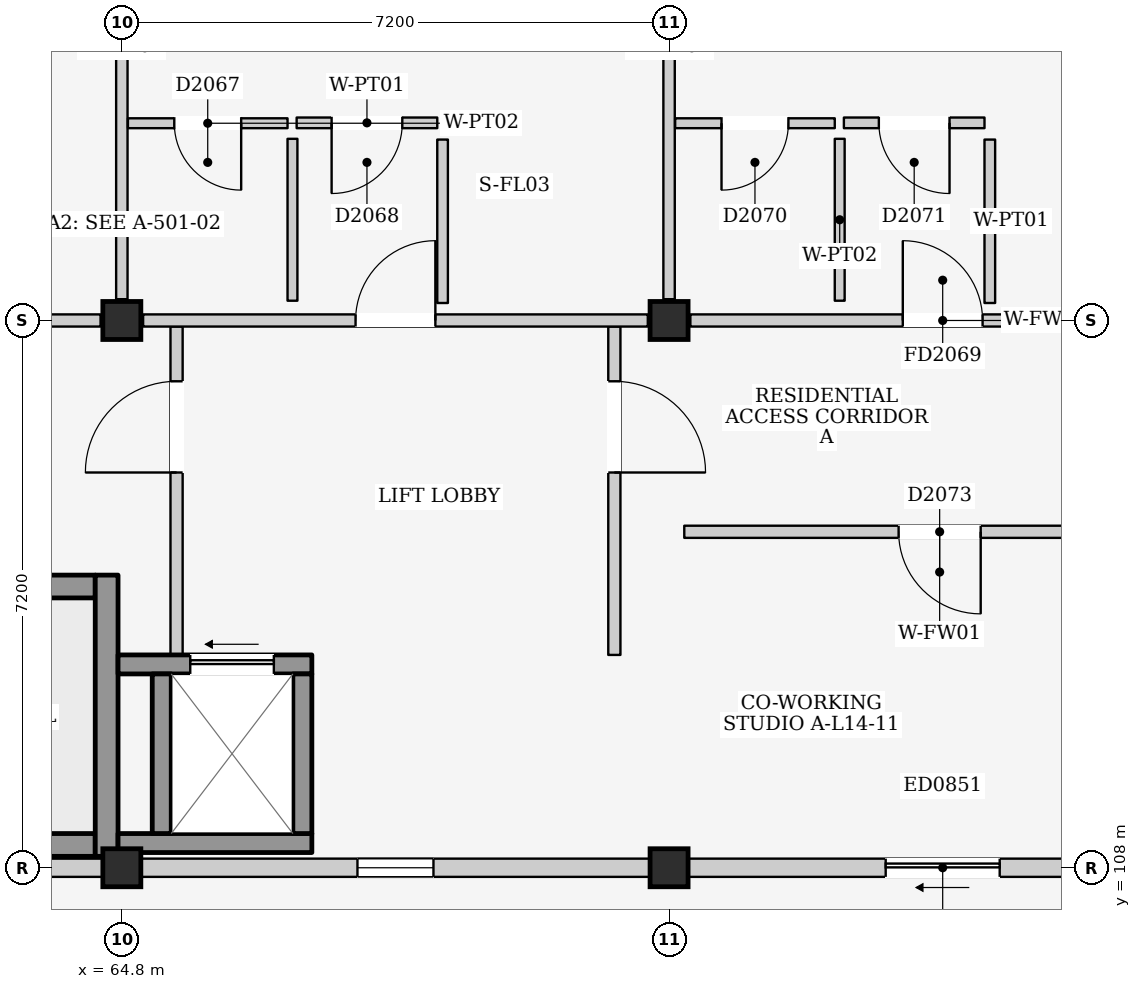
"""IFC4 building model, lengths in metres.
Left out: names, types, materials, properties, quantities, classifications, styles, units other than length and angle.
Written with IfcOpenShell. Run it as: python <this file> out.ifc"""

import sys

from ifc_helpers import new_model, si_unit, direction, frame, frame_2d, origin, origin_2d, place, context, subcontext, project, spatial, rectangle, extrude, element, fill, save


model = new_model("IFC4")
c1 = context("Model", 3, precision=1e-05, world=origin(), true_north=direction((0.0, 1.0)))
c2 = subcontext(c1, "Body", "Model", "MODEL_VIEW")
j1 = project(units=[si_unit("LENGTHUNIT", "METRE"), si_unit("PLANEANGLEUNIT", "RADIAN")], contexts=[c1])
p1 = place(None, origin())
s1 = spatial("IfcSite", under=j1, at=p1, CompositionType="ELEMENT")
p2 = place(p1, origin())
s2 = spatial("IfcBuilding", under=s1, at=p2, CompositionType="ELEMENT")
p3 = place(p2, frame((0.0, 0.0, 47.7)))
s3 = spatial("IfcBuildingStorey", under=s2, at=p3, CompositionType="ELEMENT", Elevation=47.7)
for number, where, z_axis, x_axis in (
    (1, (64.8, 108.0, 0.0), (0.0, 0.0, 1.0), (1.0, 0.0, 0.0)),
    (2, (64.8, 115.2, 0.0), (0.0, 0.0, 1.0), (1.0, 0.0, 0.0)),
    (3, (72.0, 108.0, 0.0), (0.0, 0.0, 1.0), (1.0, 0.0, 0.0)),
    (4, (72.0, 115.2, 0.0), (0.0, 0.0, 1.0), (1.0, 0.0, 0.0)),
):
    element("IfcColumn", number, at=place(p3, frame(where, z_axis=z_axis, x_axis=x_axis)), inside=s3, PredefinedType="COLUMN", context=c2, shape_type="SweptSolid", body=[
        extrude(rectangle(XDim=0.5, YDim=0.5, at=origin_2d()), origin(), (0.0, 0.0, 1.0), 3.2),
    ])
p4 = place(p3, frame((57.85, 108.0, 0.0), z_axis=(0.0, 0.0, 1.0), x_axis=(1.0, 0.0, 0.0)))
e5 = element("IfcWall", 5, at=p4, inside=s3, PredefinedType="ELEMENTEDWALL", context=c2, shape_type="SweptSolid", body=[
    extrude(rectangle(XDim=6.7, YDim=0.24, at=frame_2d((3.35, 0.0))), origin(), (0.0, 0.0, 1.0), 2.335),
])
p5 = place(p4, frame((2.85, 0.0, 1.2)))
e6 = element("IfcOpeningElement", 6, at=p5, cuts=e5, PredefinedType="OPENING", context=c2, shape_type="SweptSolid", body=[
    extrude(rectangle(XDim=1.0, YDim=0.9, at=frame_2d((0.5, 0.45))), frame((0.0, 0.135, 0.0), z_axis=(0.0, -1.0, 0.0), x_axis=(1.0, 0.0, 0.0)), (0.0, 0.0, 1.0), 0.27),
])
p6 = place(p3, frame((65.05, 108.0, 0.0), z_axis=(0.0, 0.0, 1.0), x_axis=(1.0, 0.0, 0.0)))
e7 = element("IfcWall", 7, at=p6, inside=s3, PredefinedType="ELEMENTEDWALL", context=c2, shape_type="SweptSolid", body=[
    extrude(rectangle(XDim=6.7, YDim=0.24, at=frame_2d((3.35, 0.0))), origin(), (0.0, 0.0, 1.0), 2.335),
])
p7 = place(p6, frame((2.85, 0.0, 1.2)))
e8 = element("IfcOpeningElement", 8, at=p7, cuts=e7, PredefinedType="OPENING", context=c2, shape_type="SweptSolid", body=[
    extrude(rectangle(XDim=1.0, YDim=0.9, at=frame_2d((0.5, 0.45))), frame((0.0, 0.135, 0.0), z_axis=(0.0, -1.0, 0.0), x_axis=(1.0, 0.0, 0.0)), (0.0, 0.0, 1.0), 0.27),
])
p8 = place(p3, frame((72.25, 108.0, 0.0), z_axis=(0.0, 0.0, 1.0), x_axis=(1.0, 0.0, 0.0)))
e9 = element("IfcWall", 9, at=p8, inside=s3, PredefinedType="ELEMENTEDWALL", context=c2, shape_type="SweptSolid", body=[
    extrude(rectangle(XDim=6.7, YDim=0.24, at=frame_2d((3.35, 0.0))), origin(), (0.0, 0.0, 1.0), 2.335),
])
p9 = place(p8, frame((2.6, 0.0, 0.0)))
e10 = element("IfcOpeningElement", 10, at=p9, cuts=e9, PredefinedType="OPENING", context=c2, shape_type="SweptSolid", body=[
    extrude(rectangle(XDim=1.5, YDim=2.12, at=frame_2d((0.75, 1.06))), frame((0.0, 0.135, 0.0), z_axis=(0.0, -1.0, 0.0), x_axis=(1.0, 0.0, 0.0)), (0.0, 0.0, 1.0), 0.27),
])
p10 = place(p3, frame((57.95, 108.3, 0.0), z_axis=(0.0, 0.0, 1.0), x_axis=(1.0, 0.0, 0.0)))
e11 = element("IfcWall", 11, at=p10, inside=s3, PredefinedType="SHEAR", context=c2, shape_type="SweptSolid", body=[
    extrude(rectangle(XDim=6.5, YDim=0.3, at=frame_2d((3.25, 0.0))), origin(), (0.0, 0.0, 1.0), 3.0),
])
p11 = place(p3, frame((57.95, 111.7, 0.0), z_axis=(0.0, 0.0, 1.0), x_axis=(1.0, 0.0, 0.0)))
e12 = element("IfcWall", 12, at=p11, inside=s3, PredefinedType="SHEAR", context=c2, shape_type="SweptSolid", body=[
    extrude(rectangle(XDim=6.5, YDim=0.3, at=frame_2d((3.25, 0.0))), origin(), (0.0, 0.0, 1.0), 3.0),
])
p12 = place(p11, frame((0.18, 0.0, 0.0)))
e13 = element("IfcOpeningElement", 13, at=p12, cuts=e12, PredefinedType="OPENING", context=c2, shape_type="SweptSolid", body=[
    extrude(rectangle(XDim=1.15, YDim=2.2, at=frame_2d((0.575, 1.1))), frame((0.0, 0.165, 0.0), z_axis=(0.0, -1.0, 0.0), x_axis=(1.0, 0.0, 0.0)), (0.0, 0.0, 1.0), 0.33),
])
p13 = place(p3, frame((64.6, 108.15, 0.0), z_axis=(0.0, 0.0, 1.0), x_axis=(0.0, 1.0, 0.0)))
e14 = element("IfcWall", 14, at=p13, inside=s3, PredefinedType="SHEAR", context=c2, shape_type="SweptSolid", body=[
    extrude(rectangle(XDim=3.7, YDim=0.3, at=frame_2d((1.85, 0.0))), origin(), (0.0, 0.0, 1.0), 3.0),
])
p14 = place(p3, frame((65.52, 110.8, 0.0), z_axis=(0.0, 0.0, 1.0), x_axis=(0.0, 1.0, 0.0)))
e15 = element("IfcWall", 15, at=p14, inside=s3, PredefinedType="PARTITIONING", context=c2, shape_type="SweptSolid", body=[
    extrude(rectangle(XDim=4.32, YDim=0.16, at=frame_2d((2.16, 0.0))), origin(), (0.0, 0.0, 1.0), 3.0),
])
p15 = place(p14, frame((2.4, 0.0, 0.0)))
e16 = element("IfcOpeningElement", 16, at=p15, cuts=e15, PredefinedType="OPENING", context=c2, shape_type="SweptSolid", body=[
    extrude(rectangle(XDim=1.2, YDim=2.2, at=frame_2d((0.6, 1.1))), frame((0.0, 0.095, 0.0), z_axis=(0.0, -1.0, 0.0), x_axis=(1.0, 0.0, 0.0)), (0.0, 0.0, 1.0), 0.19),
])
p16 = place(p3, frame((71.28, 110.8, 0.0), z_axis=(0.0, 0.0, 1.0), x_axis=(0.0, 1.0, 0.0)))
e17 = element("IfcWall", 17, at=p16, inside=s3, PredefinedType="PARTITIONING", context=c2, shape_type="SweptSolid", body=[
    extrude(rectangle(XDim=4.32, YDim=0.16, at=frame_2d((2.16, 0.0))), origin(), (0.0, 0.0, 1.0), 3.0),
])
p17 = place(p16, frame((2.4, 0.0, 0.0)))
e18 = element("IfcOpeningElement", 18, at=p17, cuts=e17, PredefinedType="OPENING", context=c2, shape_type="SweptSolid", body=[
    extrude(rectangle(XDim=1.2, YDim=2.2, at=frame_2d((0.6, 1.1))), frame((0.0, 0.095, 0.0), z_axis=(0.0, -1.0, 0.0), x_axis=(1.0, 0.0, 0.0)), (0.0, 0.0, 1.0), 0.19),
])
p18 = place(p3, frame((64.75, 108.325, 0.0), z_axis=(0.0, 0.0, 1.0), x_axis=(1.0, 0.0, 0.0)))
e19 = element("IfcWall", 19, at=p18, inside=s3, PredefinedType="SHEAR", context=c2, shape_type="SweptSolid", body=[
    extrude(rectangle(XDim=2.55, YDim=0.25, at=frame_2d((1.275, 0.0))), origin(), (0.0, 0.0, 1.0), 3.0),
])
p19 = place(p3, frame((64.75, 110.675, 0.0), z_axis=(0.0, 0.0, 1.0), x_axis=(1.0, 0.0, 0.0)))
e20 = element("IfcWall", 20, at=p19, inside=s3, PredefinedType="SHEAR", context=c2, shape_type="SweptSolid", body=[
    extrude(rectangle(XDim=2.55, YDim=0.25, at=frame_2d((1.275, 0.0))), origin(), (0.0, 0.0, 1.0), 3.0),
])
p20 = place(p19, frame((0.95, 0.0, 0.0)))
e21 = element("IfcOpeningElement", 21, at=p20, cuts=e20, PredefinedType="OPENING", context=c2, shape_type="SweptSolid", body=[
    extrude(rectangle(XDim=1.1, YDim=2.15, at=frame_2d((0.55, 1.075))), frame((0.0, 0.14, 0.0), z_axis=(0.0, -1.0, 0.0), x_axis=(1.0, 0.0, 0.0)), (0.0, 0.0, 1.0), 0.28),
])
for number, where, z_axis, x_axis in (
    (22, (65.325, 108.45, 0.0), (0.0, 0.0, 1.0), (0.0, 1.0, 0.0)),
    (23, (67.175, 108.45, 0.0), (0.0, 0.0, 1.0), (0.0, 1.0, 0.0)),
):
    element("IfcWall", number, at=place(p3, frame(where, z_axis=z_axis, x_axis=x_axis)), inside=s3, PredefinedType="SHEAR", context=c2, shape_type="SweptSolid", body=[
        extrude(rectangle(XDim=2.1, YDim=0.25, at=frame_2d((1.05, 0.0))), origin(), (0.0, 0.0, 1.0), 3.0),
    ])
p21 = place(p3, frame((57.88, 115.2, 0.0), z_axis=(0.0, 0.0, 1.0), x_axis=(1.0, 0.0, 0.0)))
e24 = element("IfcWall", 24, at=p21, inside=s3, PredefinedType="PARTITIONING", context=c2, shape_type="SweptSolid", body=[
    extrude(rectangle(XDim=6.64, YDim=0.16, at=frame_2d((3.32, 0.0))), origin(), (0.0, 0.0, 1.0), 2.335),
])
p22 = place(p21, frame((2.795, 0.0, 0.0)))
e25 = element("IfcOpeningElement", 25, at=p22, cuts=e24, PredefinedType="OPENING", context=c2, shape_type="SweptSolid", body=[
    extrude(rectangle(XDim=1.05, YDim=2.15, at=frame_2d((0.525, 1.075))), frame((0.0, 0.095, 0.0), z_axis=(0.0, -1.0, 0.0), x_axis=(1.0, 0.0, 0.0)), (0.0, 0.0, 1.0), 0.19),
])
p23 = place(p3, frame((64.8, 115.48, 0.0), z_axis=(0.0, 0.0, 1.0), x_axis=(0.0, 1.0, 0.0)))
e26 = element("IfcWall", 26, at=p23, inside=s3, PredefinedType="PARTITIONING", context=c2, shape_type="SweptSolid", body=[
    extrude(rectangle(XDim=6.64, YDim=0.15, at=frame_2d((3.32, 0.0))), origin(), (0.0, 0.0, 1.0), 2.485),
])
p24 = place(p3, frame((65.08, 115.2, 0.0), z_axis=(0.0, 0.0, 1.0), x_axis=(1.0, 0.0, 0.0)))
e27 = element("IfcWall", 27, at=p24, inside=s3, PredefinedType="PARTITIONING", context=c2, shape_type="SweptSolid", body=[
    extrude(rectangle(XDim=6.64, YDim=0.16, at=frame_2d((3.32, 0.0))), origin(), (0.0, 0.0, 1.0), 2.335),
])
p25 = place(p24, frame((2.795, 0.0, 0.0)))
e28 = element("IfcOpeningElement", 28, at=p25, cuts=e27, PredefinedType="OPENING", context=c2, shape_type="SweptSolid", body=[
    extrude(rectangle(XDim=1.05, YDim=2.15, at=frame_2d((0.525, 1.075))), frame((0.0, 0.095, 0.0), z_axis=(0.0, -1.0, 0.0), x_axis=(1.0, 0.0, 0.0)), (0.0, 0.0, 1.0), 0.19),
])
p26 = place(p3, frame((72.0, 115.48, 0.0), z_axis=(0.0, 0.0, 1.0), x_axis=(0.0, 1.0, 0.0)))
e29 = element("IfcWall", 29, at=p26, inside=s3, PredefinedType="PARTITIONING", context=c2, shape_type="SweptSolid", body=[
    extrude(rectangle(XDim=6.64, YDim=0.15, at=frame_2d((3.32, 0.0))), origin(), (0.0, 0.0, 1.0), 2.485),
])
p27 = place(p3, frame((64.88, 117.795, 0.0), z_axis=(0.0, 0.0, 1.0), x_axis=(1.0, 0.0, 0.0)))
e30 = element("IfcWall", 30, at=p27, inside=s3, PredefinedType="PARTITIONING", context=c2, shape_type="SweptSolid", body=[
    extrude(rectangle(XDim=2.1, YDim=0.13, at=frame_2d((1.05, 0.0))), origin(), (0.0, 0.0, 1.0), 3.0),
])
p28 = place(p27, frame((0.61, 0.0, 0.0)))
e31 = element("IfcOpeningElement", 31, at=p28, cuts=e30, PredefinedType="OPENING", context=c2, shape_type="SweptSolid", body=[
    extrude(rectangle(XDim=0.88, YDim=2.1, at=frame_2d((0.44, 1.05))), frame((0.0, 0.08, 0.0), z_axis=(0.0, -1.0, 0.0), x_axis=(1.0, 0.0, 0.0)), (0.0, 0.0, 1.0), 0.16),
])
p29 = place(p3, frame((67.045, 115.46, 0.0), z_axis=(0.0, 0.0, 1.0), x_axis=(0.0, 1.0, 0.0)))
e32 = element("IfcWall", 32, at=p29, inside=s3, PredefinedType="PARTITIONING", context=c2, shape_type="SweptSolid", body=[
    extrude(rectangle(XDim=2.13, YDim=0.13, at=frame_2d((1.065, 0.0))), origin(), (0.0, 0.0, 1.0), 3.0),
])
p30 = place(p3, frame((67.1, 117.8, 0.0), z_axis=(0.0, 0.0, 1.0), x_axis=(1.0, 0.0, 0.0)))
e33 = element("IfcWall", 33, at=p30, inside=s3, PredefinedType="PARTITIONING", context=c2, shape_type="SweptSolid", body=[
    extrude(rectangle(XDim=1.85, YDim=0.14, at=frame_2d((0.925, 0.0))), origin(), (0.0, 0.0, 1.0), 3.0),
])
p31 = place(p30, frame((0.46, 0.0, 0.0)))
e34 = element("IfcOpeningElement", 34, at=p31, cuts=e33, PredefinedType="OPENING", context=c2, shape_type="SweptSolid", body=[
    extrude(rectangle(XDim=0.93, YDim=2.14, at=frame_2d((0.465, 1.07))), frame((0.0, 0.085, 0.0), z_axis=(0.0, -1.0, 0.0), x_axis=(1.0, 0.0, 0.0)), (0.0, 0.0, 1.0), 0.17),
])
p32 = place(p3, frame((69.02, 115.43, 0.0), z_axis=(0.0, 0.0, 1.0), x_axis=(0.0, 1.0, 0.0)))
e35 = element("IfcWall", 35, at=p32, inside=s3, PredefinedType="PARTITIONING", context=c2, shape_type="SweptSolid", body=[
    extrude(rectangle(XDim=2.15, YDim=0.14, at=frame_2d((1.075, 0.0))), origin(), (0.0, 0.0, 1.0), 3.0),
])
p33 = place(p3, frame((72.28, 115.2, 0.0), z_axis=(0.0, 0.0, 1.0), x_axis=(1.0, 0.0, 0.0)))
e36 = element("IfcWall", 36, at=p33, inside=s3, PredefinedType="PARTITIONING", context=c2, shape_type="SweptSolid", body=[
    extrude(rectangle(XDim=6.64, YDim=0.16, at=frame_2d((3.32, 0.0))), origin(), (0.0, 0.0, 1.0), 2.335),
])
p34 = place(p33, frame((2.795, 0.0, 0.0)))
e37 = element("IfcOpeningElement", 37, at=p34, cuts=e36, PredefinedType="OPENING", context=c2, shape_type="SweptSolid", body=[
    extrude(rectangle(XDim=1.05, YDim=2.15, at=frame_2d((0.525, 1.075))), frame((0.0, 0.095, 0.0), z_axis=(0.0, -1.0, 0.0), x_axis=(1.0, 0.0, 0.0)), (0.0, 0.0, 1.0), 0.19),
])
p35 = place(p3, frame((72.08, 117.795, 0.0), z_axis=(0.0, 0.0, 1.0), x_axis=(1.0, 0.0, 0.0)))
e38 = element("IfcWall", 38, at=p35, inside=s3, PredefinedType="PARTITIONING", context=c2, shape_type="SweptSolid", body=[
    extrude(rectangle(XDim=2.1, YDim=0.13, at=frame_2d((1.05, 0.0))), origin(), (0.0, 0.0, 1.0), 3.0),
])
p36 = place(p35, frame((0.61, 0.0, 0.0)))
e39 = element("IfcOpeningElement", 39, at=p36, cuts=e38, PredefinedType="OPENING", context=c2, shape_type="SweptSolid", body=[
    extrude(rectangle(XDim=0.88, YDim=2.1, at=frame_2d((0.44, 1.05))), frame((0.0, 0.08, 0.0), z_axis=(0.0, -1.0, 0.0), x_axis=(1.0, 0.0, 0.0)), (0.0, 0.0, 1.0), 0.16),
])
p37 = place(p3, frame((74.245, 115.46, 0.0), z_axis=(0.0, 0.0, 1.0), x_axis=(0.0, 1.0, 0.0)))
e40 = element("IfcWall", 40, at=p37, inside=s3, PredefinedType="PARTITIONING", context=c2, shape_type="SweptSolid", body=[
    extrude(rectangle(XDim=2.13, YDim=0.13, at=frame_2d((1.065, 0.0))), origin(), (0.0, 0.0, 1.0), 3.0),
])
p38 = place(p3, frame((74.3, 117.8, 0.0), z_axis=(0.0, 0.0, 1.0), x_axis=(1.0, 0.0, 0.0)))
e41 = element("IfcWall", 41, at=p38, inside=s3, PredefinedType="PARTITIONING", context=c2, shape_type="SweptSolid", body=[
    extrude(rectangle(XDim=1.85, YDim=0.14, at=frame_2d((0.925, 0.0))), origin(), (0.0, 0.0, 1.0), 3.0),
])
p39 = place(p38, frame((0.46, 0.0, 0.0)))
e42 = element("IfcOpeningElement", 42, at=p39, cuts=e41, PredefinedType="OPENING", context=c2, shape_type="SweptSolid", body=[
    extrude(rectangle(XDim=0.93, YDim=2.14, at=frame_2d((0.465, 1.07))), frame((0.0, 0.085, 0.0), z_axis=(0.0, -1.0, 0.0), x_axis=(1.0, 0.0, 0.0)), (0.0, 0.0, 1.0), 0.17),
])
p40 = place(p3, frame((76.22, 115.43, 0.0), z_axis=(0.0, 0.0, 1.0), x_axis=(0.0, 1.0, 0.0)))
e43 = element("IfcWall", 43, at=p40, inside=s3, PredefinedType="PARTITIONING", context=c2, shape_type="SweptSolid", body=[
    extrude(rectangle(XDim=2.15, YDim=0.14, at=frame_2d((1.075, 0.0))), origin(), (0.0, 0.0, 1.0), 3.0),
])
p41 = place(p3, frame((72.2, 112.42, 0.0), z_axis=(0.0, 0.0, 1.0), x_axis=(1.0, 0.0, 0.0)))
e44 = element("IfcWall", 44, at=p41, inside=s3, PredefinedType="PARTITIONING", context=c2, shape_type="SweptSolid", body=[
    extrude(rectangle(XDim=6.72, YDim=0.16, at=frame_2d((3.36, 0.0))), origin(), (0.0, 0.0, 1.0), 3.0),
])
p42 = place(p41, frame((2.82, 0.0, 0.0)))
e45 = element("IfcOpeningElement", 45, at=p42, cuts=e44, PredefinedType="OPENING", context=c2, shape_type="SweptSolid", body=[
    extrude(rectangle(XDim=1.08, YDim=2.22, at=frame_2d((0.54, 1.11))), frame((0.0, 0.095, 0.0), z_axis=(0.0, -1.0, 0.0), x_axis=(1.0, 0.0, 0.0)), (0.0, 0.0, 1.0), 0.19),
])
p43 = place(p7, origin())
e46 = element("IfcWindow", 46, at=p43, inside=s3, PartitioningType="SINGLE_PANEL", PredefinedType="WINDOW", context=c2, shape_type="SweptSolid", body=[
    extrude(rectangle(XDim=1.0, YDim=0.9, at=frame_2d((0.5, 0.45))), frame((0.0, 0.03, 0.0), z_axis=(0.0, -1.0, 0.0), x_axis=(1.0, 0.0, 0.0)), (0.0, 0.0, 1.0), 0.06),
])
fill(e8, e46)
p44 = place(p9, frame((1.5, 0.0, 0.0), z_axis=(0.0, 0.0, 1.0), x_axis=(-1.0, 0.0, 0.0)))
e47 = element("IfcDoor", 47, at=p44, inside=s3, OperationType="SLIDING_TO_LEFT", PredefinedType="DOOR", context=c2, shape_type="SweptSolid", body=[
    extrude(rectangle(XDim=1.5, YDim=2.12, at=frame_2d((0.75, 1.06))), frame((0.0, 0.025, 0.0), z_axis=(0.0, -1.0, 0.0), x_axis=(1.0, 0.0, 0.0)), (0.0, 0.0, 1.0), 0.05),
])
fill(e10, e47)
p45 = place(p15, origin())
e48 = element("IfcDoor", 48, at=p45, inside=s3, OperationType="SINGLE_SWING_LEFT", PredefinedType="DOOR", context=c2, shape_type="SweptSolid", body=[
    extrude(rectangle(XDim=1.2, YDim=2.2, at=frame_2d((0.6, 1.1))), frame((0.0, 0.025, 0.0), z_axis=(0.0, -1.0, 0.0), x_axis=(1.0, 0.0, 0.0)), (0.0, 0.0, 1.0), 0.05),
])
fill(e16, e48)
p46 = place(p17, frame((1.2, 0.0, 0.0), z_axis=(0.0, 0.0, 1.0), x_axis=(-1.0, 0.0, 0.0)))
e49 = element("IfcDoor", 49, at=p46, inside=s3, OperationType="SINGLE_SWING_RIGHT", PredefinedType="DOOR", context=c2, shape_type="SweptSolid", body=[
    extrude(rectangle(XDim=1.2, YDim=2.2, at=frame_2d((0.6, 1.1))), frame((0.0, 0.025, 0.0), z_axis=(0.0, -1.0, 0.0), x_axis=(1.0, 0.0, 0.0)), (0.0, 0.0, 1.0), 0.05),
])
fill(e18, e49)
p47 = place(p20, origin())
e50 = element("IfcDoor", 50, at=p47, inside=s3, OperationType="SLIDING_TO_LEFT", PredefinedType="DOOR", context=c2, shape_type="SweptSolid", body=[
    extrude(rectangle(XDim=1.1, YDim=2.15, at=frame_2d((0.55, 1.075))), frame((0.0, 0.025, 0.0), z_axis=(0.0, -1.0, 0.0), x_axis=(1.0, 0.0, 0.0)), (0.0, 0.0, 1.0), 0.05),
])
fill(e21, e50)
p48 = place(p25, origin())
e51 = element("IfcDoor", 51, at=p48, inside=s3, OperationType="SINGLE_SWING_RIGHT", PredefinedType="DOOR", context=c2, shape_type="SweptSolid", body=[
    extrude(rectangle(XDim=1.05, YDim=2.15, at=frame_2d((0.525, 1.075))), frame((0.0, 0.025, 0.0), z_axis=(0.0, -1.0, 0.0), x_axis=(1.0, 0.0, 0.0)), (0.0, 0.0, 1.0), 0.05),
])
fill(e28, e51)
p49 = place(p28, frame((0.88, 0.0, 0.0), z_axis=(0.0, 0.0, 1.0), x_axis=(-1.0, 0.0, 0.0)))
e52 = element("IfcDoor", 52, at=p49, inside=s3, OperationType="SINGLE_SWING_LEFT", PredefinedType="DOOR", context=c2, shape_type="SweptSolid", body=[
    extrude(rectangle(XDim=0.88, YDim=2.1, at=frame_2d((0.44, 1.05))), frame((0.0, 0.025, 0.0), z_axis=(0.0, -1.0, 0.0), x_axis=(1.0, 0.0, 0.0)), (0.0, 0.0, 1.0), 0.05),
])
fill(e31, e52)
p50 = place(p31, frame((0.93, 0.0, 0.0), z_axis=(0.0, 0.0, 1.0), x_axis=(-1.0, 0.0, 0.0)))
e53 = element("IfcDoor", 53, at=p50, inside=s3, OperationType="SINGLE_SWING_RIGHT", PredefinedType="DOOR", context=c2, shape_type="SweptSolid", body=[
    extrude(rectangle(XDim=0.93, YDim=2.14, at=frame_2d((0.465, 1.07))), frame((0.0, 0.025, 0.0), z_axis=(0.0, -1.0, 0.0), x_axis=(1.0, 0.0, 0.0)), (0.0, 0.0, 1.0), 0.05),
])
fill(e34, e53)
p51 = place(p34, origin())
e54 = element("IfcDoor", 54, at=p51, inside=s3, OperationType="SINGLE_SWING_LEFT", PredefinedType="DOOR", context=c2, shape_type="SweptSolid", body=[
    extrude(rectangle(XDim=1.05, YDim=2.15, at=frame_2d((0.525, 1.075))), frame((0.0, 0.025, 0.0), z_axis=(0.0, -1.0, 0.0), x_axis=(1.0, 0.0, 0.0)), (0.0, 0.0, 1.0), 0.05),
])
fill(e37, e54)
p52 = place(p36, frame((0.88, 0.0, 0.0), z_axis=(0.0, 0.0, 1.0), x_axis=(-1.0, 0.0, 0.0)))
e55 = element("IfcDoor", 55, at=p52, inside=s3, OperationType="SINGLE_SWING_RIGHT", PredefinedType="DOOR", context=c2, shape_type="SweptSolid", body=[
    extrude(rectangle(XDim=0.88, YDim=2.1, at=frame_2d((0.44, 1.05))), frame((0.0, 0.025, 0.0), z_axis=(0.0, -1.0, 0.0), x_axis=(1.0, 0.0, 0.0)), (0.0, 0.0, 1.0), 0.05),
])
fill(e39, e55)
p53 = place(p39, frame((0.93, 0.0, 0.0), z_axis=(0.0, 0.0, 1.0), x_axis=(-1.0, 0.0, 0.0)))
e56 = element("IfcDoor", 56, at=p53, inside=s3, OperationType="SINGLE_SWING_LEFT", PredefinedType="DOOR", context=c2, shape_type="SweptSolid", body=[
    extrude(rectangle(XDim=0.93, YDim=2.14, at=frame_2d((0.465, 1.07))), frame((0.0, 0.025, 0.0), z_axis=(0.0, -1.0, 0.0), x_axis=(1.0, 0.0, 0.0)), (0.0, 0.0, 1.0), 0.05),
])
fill(e42, e56)
p54 = place(p42, frame((1.08, 0.0, 0.0), z_axis=(0.0, 0.0, 1.0), x_axis=(-1.0, 0.0, 0.0)))
e57 = element("IfcDoor", 57, at=p54, inside=s3, OperationType="SINGLE_SWING_LEFT", PredefinedType="DOOR", context=c2, shape_type="SweptSolid", body=[
    extrude(rectangle(XDim=1.08, YDim=2.22, at=frame_2d((0.54, 1.11))), frame((0.0, 0.025, 0.0), z_axis=(0.0, -1.0, 0.0), x_axis=(1.0, 0.0, 0.0)), (0.0, 0.0, 1.0), 0.05),
])
fill(e45, e57)
save(model, sys.argv[1])
